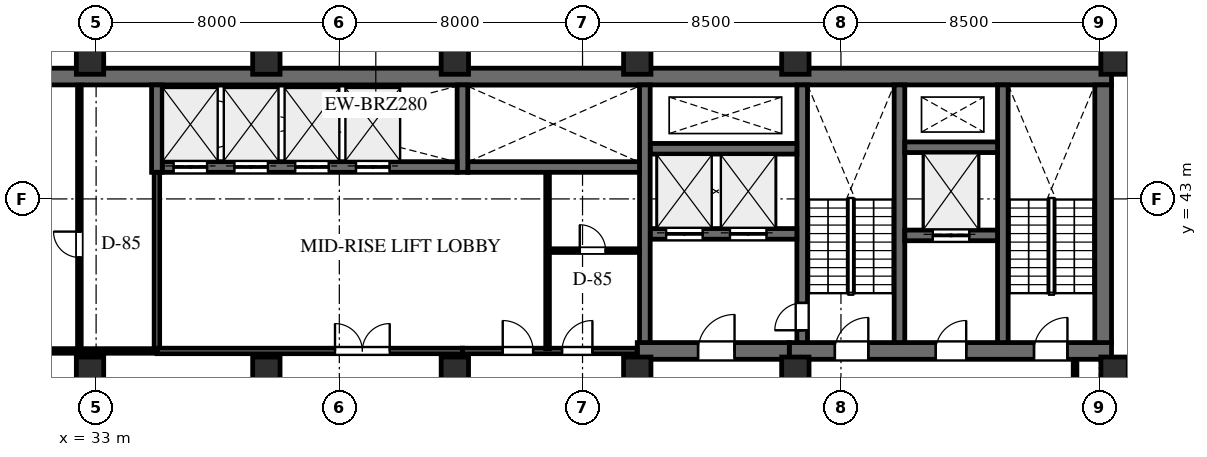
"""IFC4 building model, lengths in metres.
Left out: names, types, materials, properties, quantities, classifications, styles, units other than length and angle.
Written with IfcOpenShell. Run it as: python <this file> out.ifc"""

import sys

from ifc_helpers import new_model, si_unit, direction, frame, frame_2d, origin, origin_2d, place, context, subcontext, project, spatial, rectangle, extrude, element, fill, save


model = new_model("IFC4")
c1 = context("Model", 3, precision=1e-05, world=origin(), true_north=direction((0.0, 1.0)))
c2 = subcontext(c1, "Body", "Model", "MODEL_VIEW")
j1 = project(units=[si_unit("LENGTHUNIT", "METRE"), si_unit("PLANEANGLEUNIT", "RADIAN")], contexts=[c1])
p1 = place(None, origin())
s1 = spatial("IfcSite", under=j1, at=p1, CompositionType="ELEMENT")
p2 = place(p1, origin())
s2 = spatial("IfcBuilding", under=s1, at=p2, CompositionType="ELEMENT")
p3 = place(p2, frame((0.0, 0.0, 160.5)))
s3 = spatial("IfcBuildingStorey", under=s2, at=p3, CompositionType="ELEMENT", Elevation=160.5)
p4 = place(p3, frame((22.9, 47.025, 0.0), z_axis=(0.0, 0.0, 1.0), x_axis=(1.0, 0.0, 0.0)))
e1 = element("IfcWall", 1, at=p4, inside=s3, PredefinedType="SHEAR", context=c2, shape_type="SweptSolid", body=[
    extrude(rectangle(XDim=43.5, YDim=0.55, at=frame_2d((21.75, 0.0))), origin(), (0.0, 0.0, 1.0), 4.0),
])
p5 = place(p3, frame((55.8, 38.0, 0.0), z_axis=(0.0, 0.0, 1.0), x_axis=(1.0, 0.0, 0.0)))
e2 = element("IfcWall", 2, at=p5, inside=s3, PredefinedType="SHEAR", context=c2, shape_type="SweptSolid", body=[
    extrude(rectangle(XDim=10.6, YDim=0.55, at=frame_2d((5.3, 0.0))), origin(), (0.0, 0.0, 1.0), 4.0),
])
p6 = place(p5, frame((1.5, 0.0, 0.0)))
e3 = element("IfcOpeningElement", 3, at=p6, cuts=e2, PredefinedType="OPENING", context=c2, shape_type="SweptSolid", body=[
    extrude(rectangle(XDim=1.1, YDim=2.2, at=frame_2d((0.55, 1.1))), frame((0.0, 0.285, 0.0), z_axis=(0.0, -1.0, 0.0), x_axis=(1.0, 0.0, 0.0)), (0.0, 0.0, 1.0), 0.57),
])
p7 = place(p5, frame((4.82, 0.0, 0.0)))
e4 = element("IfcOpeningElement", 4, at=p7, cuts=e2, PredefinedType="OPENING", context=c2, shape_type="SweptSolid", body=[
    extrude(rectangle(XDim=1.0, YDim=2.15, at=frame_2d((0.5, 1.075))), frame((0.0, 0.285, 0.0), z_axis=(0.0, -1.0, 0.0), x_axis=(1.0, 0.0, 0.0)), (0.0, 0.0, 1.0), 0.57),
])
p8 = place(p5, frame((8.05, 0.0, 0.0)))
e5 = element("IfcOpeningElement", 5, at=p8, cuts=e2, PredefinedType="OPENING", context=c2, shape_type="SweptSolid", body=[
    extrude(rectangle(XDim=1.1, YDim=2.2, at=frame_2d((0.55, 1.1))), frame((0.0, 0.285, 0.0), z_axis=(0.0, -1.0, 0.0), x_axis=(1.0, 0.0, 0.0)), (0.0, 0.0, 1.0), 0.57),
])
p9 = place(p3, frame((66.125, 38.275, 0.0), z_axis=(0.0, 0.0, 1.0), x_axis=(0.0, 1.0, 0.0)))
e6 = element("IfcWall", 6, at=p9, inside=s3, PredefinedType="SHEAR", context=c2, shape_type="SweptSolid", body=[
    extrude(rectangle(XDim=8.475, YDim=0.55, at=frame_2d((4.238, 0.0))), origin(), (0.0, 0.0, 1.0), 4.0),
])
for number, where, z_axis, x_axis in (
    (7, (62.825, 38.275, 0.0), (0.0, 0.0, 1.0), (0.0, 1.0, 0.0)),
    (8, (59.425, 38.275, 0.0), (0.0, 0.0, 1.0), (0.0, 1.0, 0.0)),
):
    element("IfcWall", number, at=place(p3, frame(where, z_axis=z_axis, x_axis=x_axis)), inside=s3, PredefinedType="SHEAR", context=c2, shape_type="SweptSolid", body=[
        extrude(rectangle(XDim=8.475, YDim=0.35, at=frame_2d((4.238, 0.0))), origin(), (0.0, 0.0, 1.0), 4.0),
    ])
p10 = place(p3, frame((56.225, 38.275, 0.0), z_axis=(0.0, 0.0, 1.0), x_axis=(0.0, 1.0, 0.0)))
e9 = element("IfcWall", 9, at=p10, inside=s3, PredefinedType="SHEAR", context=c2, shape_type="SweptSolid", body=[
    extrude(rectangle(XDim=8.475, YDim=0.35, at=frame_2d((4.238, 0.0))), origin(), (0.0, 0.0, 1.0), 4.0),
])
p11 = place(p10, frame((0.405, 0.0, 0.0)))
e10 = element("IfcOpeningElement", 10, at=p11, cuts=e9, PredefinedType="OPENING", context=c2, shape_type="SweptSolid", body=[
    extrude(rectangle(XDim=0.9, YDim=2.15, at=frame_2d((0.45, 1.075))), frame((0.0, 0.185, 0.0), z_axis=(0.0, -1.0, 0.0), x_axis=(1.0, 0.0, 0.0)), (0.0, 0.0, 1.0), 0.37),
])
p12 = place(p3, frame((59.6, 41.8, 0.0), z_axis=(0.0, 0.0, 1.0), x_axis=(1.0, 0.0, 0.0)))
e11 = element("IfcWall", 11, at=p12, inside=s3, PredefinedType="SHEAR", context=c2, shape_type="SweptSolid", body=[
    extrude(rectangle(XDim=3.05, YDim=0.35, at=frame_2d((1.525, 0.0))), origin(), (0.0, 0.0, 1.0), 4.0),
])
p13 = place(p12, frame((0.92, 0.0, 0.0)))
e12 = element("IfcOpeningElement", 12, at=p13, cuts=e11, PredefinedType="OPENING", context=c2, shape_type="SweptSolid", body=[
    extrude(rectangle(XDim=1.2, YDim=2.2, at=frame_2d((0.6, 1.1))), frame((0.0, 0.185, 0.0), z_axis=(0.0, -1.0, 0.0), x_axis=(1.0, 0.0, 0.0)), (0.0, 0.0, 1.0), 0.37),
])
p14 = place(p3, frame((59.6, 44.7, 0.0), z_axis=(0.0, 0.0, 1.0), x_axis=(1.0, 0.0, 0.0)))
e13 = element("IfcWall", 13, at=p14, inside=s3, PredefinedType="SHEAR", context=c2, shape_type="SweptSolid", body=[
    extrude(rectangle(XDim=3.05, YDim=0.35, at=frame_2d((1.525, 0.0))), origin(), (0.0, 0.0, 1.0), 4.0),
])
p15 = place(p3, frame((50.8, 38.0, 0.0), z_axis=(0.0, 0.0, 1.0), x_axis=(1.0, 0.0, 0.0)))
e14 = element("IfcWall", 14, at=p15, inside=s3, PredefinedType="SHEAR", context=c2, shape_type="SweptSolid", body=[
    extrude(rectangle(XDim=5.0, YDim=0.55, at=frame_2d((2.5, 0.0))), origin(), (0.0, 0.0, 1.0), 4.0),
])
p16 = place(p15, frame((2.0, 0.0, 0.0)))
e15 = element("IfcOpeningElement", 15, at=p16, cuts=e14, PredefinedType="OPENING", context=c2, shape_type="SweptSolid", body=[
    extrude(rectangle(XDim=1.2, YDim=2.2, at=frame_2d((0.6, 1.1))), frame((0.0, 0.285, 0.0), z_axis=(0.0, -1.0, 0.0), x_axis=(1.0, 0.0, 0.0)), (0.0, 0.0, 1.0), 0.57),
])
p17 = place(p3, frame((51.225, 41.85, 0.0), z_axis=(0.0, 0.0, 1.0), x_axis=(1.0, 0.0, 0.0)))
e16 = element("IfcWall", 16, at=p17, inside=s3, PredefinedType="SHEAR", context=c2, shape_type="SweptSolid", body=[
    extrude(rectangle(XDim=4.825, YDim=0.35, at=frame_2d((2.413, 0.0))), origin(), (0.0, 0.0, 1.0), 4.0),
])
p18 = place(p17, frame((0.525, 0.0, 0.0)))
e17 = element("IfcOpeningElement", 17, at=p18, cuts=e16, PredefinedType="OPENING", context=c2, shape_type="SweptSolid", body=[
    extrude(rectangle(XDim=1.2, YDim=2.2, at=frame_2d((0.6, 1.1))), frame((0.0, 0.185, 0.0), z_axis=(0.0, -1.0, 0.0), x_axis=(1.0, 0.0, 0.0)), (0.0, 0.0, 1.0), 0.37),
])
p19 = place(p17, frame((2.625, 0.0, 0.0)))
e18 = element("IfcOpeningElement", 18, at=p19, cuts=e16, PredefinedType="OPENING", context=c2, shape_type="SweptSolid", body=[
    extrude(rectangle(XDim=1.2, YDim=2.2, at=frame_2d((0.6, 1.1))), frame((0.0, 0.185, 0.0), z_axis=(0.0, -1.0, 0.0), x_axis=(1.0, 0.0, 0.0)), (0.0, 0.0, 1.0), 0.37),
])
p20 = place(p3, frame((51.225, 44.65, 0.0), z_axis=(0.0, 0.0, 1.0), x_axis=(1.0, 0.0, 0.0)))
e19 = element("IfcWall", 19, at=p20, inside=s3, PredefinedType="SHEAR", context=c2, shape_type="SweptSolid", body=[
    extrude(rectangle(XDim=4.825, YDim=0.35, at=frame_2d((2.413, 0.0))), origin(), (0.0, 0.0, 1.0), 4.0),
])
p21 = place(p3, frame((51.05, 38.275, 0.0), z_axis=(0.0, 0.0, 1.0), x_axis=(0.0, 1.0, 0.0)))
e20 = element("IfcWall", 20, at=p21, inside=s3, PredefinedType="SHEAR", context=c2, shape_type="SweptSolid", body=[
    extrude(rectangle(XDim=8.475, YDim=0.35, at=frame_2d((4.238, 0.0))), origin(), (0.0, 0.0, 1.0), 4.0),
])
p22 = place(p3, frame((45.225, 44.05, 0.0), z_axis=(0.0, 0.0, 1.0), x_axis=(1.0, 0.0, 0.0)))
e21 = element("IfcWall", 21, at=p22, inside=s3, PredefinedType="SHEAR", context=c2, shape_type="SweptSolid", body=[
    extrude(rectangle(XDim=5.65, YDim=0.35, at=frame_2d((2.825, 0.0))), origin(), (0.0, 0.0, 1.0), 4.0),
])
p23 = place(p3, frame((45.05, 43.875, 0.0), z_axis=(0.0, 0.0, 1.0), x_axis=(0.0, 1.0, 0.0)))
e22 = element("IfcWall", 22, at=p23, inside=s3, PredefinedType="SHEAR", context=c2, shape_type="SweptSolid", body=[
    extrude(rectangle(XDim=2.875, YDim=0.35, at=frame_2d((1.438, 0.0))), origin(), (0.0, 0.0, 1.0), 4.0),
])
p24 = place(p3, frame((35.175, 44.05, 0.0), z_axis=(0.0, 0.0, 1.0), x_axis=(1.0, 0.0, 0.0)))
e23 = element("IfcWall", 23, at=p24, inside=s3, PredefinedType="SHEAR", context=c2, shape_type="SweptSolid", body=[
    extrude(rectangle(XDim=9.7, YDim=0.35, at=frame_2d((4.85, 0.0))), origin(), (0.0, 0.0, 1.0), 4.0),
])
p25 = place(p24, frame((0.375, 0.0, 0.0)))
e24 = element("IfcOpeningElement", 24, at=p25, cuts=e23, PredefinedType="OPENING", context=c2, shape_type="SweptSolid", body=[
    extrude(rectangle(XDim=1.1, YDim=2.2, at=frame_2d((0.55, 1.1))), frame((0.0, 0.185, 0.0), z_axis=(0.0, -1.0, 0.0), x_axis=(1.0, 0.0, 0.0)), (0.0, 0.0, 1.0), 0.37),
])
p26 = place(p24, frame((2.375, 0.0, 0.0)))
e25 = element("IfcOpeningElement", 25, at=p26, cuts=e23, PredefinedType="OPENING", context=c2, shape_type="SweptSolid", body=[
    extrude(rectangle(XDim=1.1, YDim=2.2, at=frame_2d((0.55, 1.1))), frame((0.0, 0.185, 0.0), z_axis=(0.0, -1.0, 0.0), x_axis=(1.0, 0.0, 0.0)), (0.0, 0.0, 1.0), 0.37),
])
p27 = place(p24, frame((4.375, 0.0, 0.0)))
e26 = element("IfcOpeningElement", 26, at=p27, cuts=e23, PredefinedType="OPENING", context=c2, shape_type="SweptSolid", body=[
    extrude(rectangle(XDim=1.1, YDim=2.2, at=frame_2d((0.55, 1.1))), frame((0.0, 0.185, 0.0), z_axis=(0.0, -1.0, 0.0), x_axis=(1.0, 0.0, 0.0)), (0.0, 0.0, 1.0), 0.37),
])
p28 = place(p24, frame((6.375, 0.0, 0.0)))
e27 = element("IfcOpeningElement", 27, at=p28, cuts=e23, PredefinedType="OPENING", context=c2, shape_type="SweptSolid", body=[
    extrude(rectangle(XDim=1.1, YDim=2.2, at=frame_2d((0.55, 1.1))), frame((0.0, 0.185, 0.0), z_axis=(0.0, -1.0, 0.0), x_axis=(1.0, 0.0, 0.0)), (0.0, 0.0, 1.0), 0.37),
])
p29 = place(p3, frame((35.0, 43.875, 0.0), z_axis=(0.0, 0.0, 1.0), x_axis=(0.0, 1.0, 0.0)))
e28 = element("IfcWall", 28, at=p29, inside=s3, PredefinedType="SHEAR", context=c2, shape_type="SweptSolid", body=[
    extrude(rectangle(XDim=2.875, YDim=0.35, at=frame_2d((1.438, 0.0))), origin(), (0.0, 0.0, 1.0), 4.0),
])
for number, where, z_axis, x_axis in (
    (29, (66.5, 47.55, 0.0), (0.0, 0.0, 1.0), (1.0, 0.0, 0.0)),
    (30, (56.0, 47.55, 0.0), (0.0, 0.0, 1.0), (1.0, 0.0, 0.0)),
    (31, (66.5, 37.35, 0.0), (0.0, 0.0, 1.0), (1.0, 0.0, 0.0)),
    (32, (56.0, 37.35, 0.0), (0.0, 0.0, 1.0), (1.0, 0.0, 0.0)),
    (33, (50.8, 47.55, 0.0), (0.0, 0.0, 1.0), (1.0, 0.0, 0.0)),
    (34, (50.8, 37.35, 0.0), (0.0, 0.0, 1.0), (1.0, 0.0, 0.0)),
    (35, (44.8, 37.35, 0.0), (0.0, 0.0, 1.0), (1.0, 0.0, 0.0)),
    (36, (44.8, 47.55, 0.0), (0.0, 0.0, 1.0), (1.0, 0.0, 0.0)),
    (37, (38.6, 37.35, 0.0), (0.0, 0.0, 1.0), (1.0, 0.0, 0.0)),
    (38, (38.6, 47.55, 0.0), (0.0, 0.0, 1.0), (1.0, 0.0, 0.0)),
    (39, (32.8, 37.35, 0.0), (0.0, 0.0, 1.0), (1.0, 0.0, 0.0)),
    (40, (32.8, 47.55, 0.0), (0.0, 0.0, 1.0), (1.0, 0.0, 0.0)),
):
    element("IfcColumn", number, at=place(p3, frame(where, z_axis=z_axis, x_axis=x_axis)), inside=s3, PredefinedType="COLUMN", context=c2, shape_type="SweptSolid", body=[
        extrude(rectangle(XDim=0.9, YDim=0.9, at=origin_2d()), origin(), (0.0, 0.0, 1.0), 4.0),
    ])
p30 = place(p3, frame((45.05, 38.0, 0.0), z_axis=(0.0, 0.0, 1.0), x_axis=(1.0, 0.0, 0.0)))
e41 = element("IfcWall", 41, at=p30, inside=s3, PredefinedType="STANDARD", context=c2, shape_type="SweptSolid", body=[
    extrude(rectangle(XDim=5.75, YDim=0.18, at=frame_2d((2.875, 0.0))), origin(), (0.0, 0.0, 1.0), 2.982),
])
p31 = place(p30, frame((1.325, 0.0, 0.0)))
e42 = element("IfcOpeningElement", 42, at=p31, cuts=e41, PredefinedType="OPENING", context=c2, shape_type="SweptSolid", body=[
    extrude(rectangle(XDim=1.0, YDim=2.15, at=frame_2d((0.5, 1.075))), frame((0.0, 0.1, 0.0), z_axis=(0.0, -1.0, 0.0), x_axis=(1.0, 0.0, 0.0)), (0.0, 0.0, 1.0), 0.2),
])
p32 = place(p30, frame((3.275, 0.0, 0.0)))
e43 = element("IfcOpeningElement", 43, at=p32, cuts=e41, PredefinedType="OPENING", context=c2, shape_type="SweptSolid", body=[
    extrude(rectangle(XDim=1.0, YDim=2.15, at=frame_2d((0.5, 1.075))), frame((0.0, 0.1, 0.0), z_axis=(0.0, -1.0, 0.0), x_axis=(1.0, 0.0, 0.0)), (0.0, 0.0, 1.0), 0.2),
])
p33 = place(p3, frame((47.85, 38.068, 0.0), z_axis=(0.0, 0.0, 1.0), x_axis=(0.0, 1.0, 0.0)))
e44 = element("IfcWall", 44, at=p33, inside=s3, PredefinedType="PARTITIONING", context=c2, shape_type="SweptSolid", body=[
    extrude(rectangle(XDim=5.799, YDim=0.12, at=frame_2d((2.899, 0.0))), origin(), (0.0, 0.0, 1.0), 3.755),
])
p34 = place(p3, frame((47.918, 41.3, 0.0), z_axis=(0.0, 0.0, 1.0), x_axis=(1.0, 0.0, 0.0)))
e45 = element("IfcWall", 45, at=p34, inside=s3, PredefinedType="PARTITIONING", context=c2, shape_type="SweptSolid", body=[
    extrude(rectangle(XDim=2.949, YDim=0.12, at=frame_2d((1.475, 0.0))), origin(), (0.0, 0.0, 1.0), 2.982),
])
p35 = place(p34, frame((0.991, 0.0, 0.0)))
e46 = element("IfcOpeningElement", 46, at=p35, cuts=e45, PredefinedType="OPENING", context=c2, shape_type="SweptSolid", body=[
    extrude(rectangle(XDim=0.85, YDim=2.1, at=frame_2d((0.425, 1.05))), frame((0.0, 0.07, 0.0), z_axis=(0.0, -1.0, 0.0), x_axis=(1.0, 0.0, 0.0)), (0.0, 0.0, 1.0), 0.14),
])
p36 = place(p3, frame((27.05, 38.0, 0.0), z_axis=(0.0, 0.0, 1.0), x_axis=(1.0, 0.0, 0.0)))
e47 = element("IfcWall", 47, at=p36, inside=s3, PredefinedType="PARTITIONING", context=c2, shape_type="SweptSolid", body=[
    extrude(rectangle(XDim=7.95, YDim=0.15, at=frame_2d((3.975, 0.0))), origin(), (0.0, 0.0, 1.0), 2.982),
])
p37 = place(p36, frame((1.7, 0.0, 0.0)))
e48 = element("IfcOpeningElement", 48, at=p37, cuts=e47, PredefinedType="OPENING", context=c2, shape_type="SweptSolid", body=[
    extrude(rectangle(XDim=0.9, YDim=2.1, at=frame_2d((0.45, 1.05))), frame((0.0, 0.085, 0.0), z_axis=(0.0, -1.0, 0.0), x_axis=(1.0, 0.0, 0.0)), (0.0, 0.0, 1.0), 0.17),
])
p38 = place(p36, frame((3.3, 0.0, 0.0)))
e49 = element("IfcOpeningElement", 49, at=p38, cuts=e47, PredefinedType="OPENING", context=c2, shape_type="SweptSolid", body=[
    extrude(rectangle(XDim=0.9, YDim=2.1, at=frame_2d((0.45, 1.05))), frame((0.0, 0.085, 0.0), z_axis=(0.0, -1.0, 0.0), x_axis=(1.0, 0.0, 0.0)), (0.0, 0.0, 1.0), 0.17),
])
p39 = place(p3, frame((35.0, 38.0, 0.0), z_axis=(0.0, 0.0, 1.0), x_axis=(0.0, 1.0, 0.0)))
e50 = element("IfcWall", 50, at=p39, inside=s3, PredefinedType="STANDARD", context=c2, shape_type="SweptSolid", body=[
    extrude(rectangle(XDim=5.875, YDim=0.18, at=frame_2d((2.938, 0.0))), origin(), (0.0, 0.0, 1.0), 3.755),
])
p40 = place(p3, frame((32.45, 38.068, 0.0), z_axis=(0.0, 0.0, 1.0), x_axis=(0.0, 1.0, 0.0)))
e51 = element("IfcWall", 51, at=p40, inside=s3, PredefinedType="PARTITIONING", context=c2, shape_type="SweptSolid", body=[
    extrude(rectangle(XDim=8.674, YDim=0.12, at=frame_2d((4.337, 0.0))), origin(), (0.0, 0.0, 1.0), 3.755),
])
p41 = place(p40, frame((3.007, 0.0, 0.0)))
e52 = element("IfcOpeningElement", 52, at=p41, cuts=e51, PredefinedType="OPENING", context=c2, shape_type="SweptSolid", body=[
    extrude(rectangle(XDim=0.85, YDim=2.1, at=frame_2d((0.425, 1.05))), frame((0.0, 0.07, 0.0), z_axis=(0.0, -1.0, 0.0), x_axis=(1.0, 0.0, 0.0)), (0.0, 0.0, 1.0), 0.14),
])
p42 = place(p3, frame((35.0, 38.0, 0.0), z_axis=(0.0, 0.0, 1.0), x_axis=(1.0, 0.0, 0.0)))
e53 = element("IfcWall", 53, at=p42, inside=s3, PredefinedType="STANDARD", context=c2, shape_type="SweptSolid", body=[
    extrude(rectangle(XDim=10.05, YDim=0.18, at=frame_2d((5.025, 0.0))), origin(), (0.0, 0.0, 1.0), 2.982),
])
p43 = place(p42, frame((5.858, 0.0, 0.0)))
e54 = element("IfcOpeningElement", 54, at=p43, cuts=e53, PredefinedType="OPENING", context=c2, shape_type="SweptSolid", body=[
    extrude(rectangle(XDim=1.8, YDim=2.2, at=frame_2d((0.9, 1.1))), frame((0.0, 0.1, 0.0), z_axis=(0.0, -1.0, 0.0), x_axis=(1.0, 0.0, 0.0)), (0.0, 0.0, 1.0), 0.2),
])
p44 = place(p3, frame((65.2, 34.4, 0.0), z_axis=(0.0, 0.0, 1.0), x_axis=(0.0, 1.0, 0.0)))
e55 = element("IfcWall", 55, at=p44, inside=s3, PredefinedType="PARTITIONING", context=c2, shape_type="SweptSolid", body=[
    extrude(rectangle(XDim=3.317, YDim=0.12, at=frame_2d((1.659, 0.0))), origin(), (0.0, 0.0, 1.0), 2.982),
])
p45 = place(p6, origin())
e56 = element("IfcDoor", 56, at=p45, inside=s3, OperationType="SINGLE_SWING_RIGHT", PredefinedType="DOOR", context=c2, shape_type="SweptSolid", body=[
    extrude(rectangle(XDim=1.1, YDim=2.2, at=frame_2d((0.55, 1.1))), frame((0.0, 0.025, 0.0), z_axis=(0.0, -1.0, 0.0), x_axis=(1.0, 0.0, 0.0)), (0.0, 0.0, 1.0), 0.05),
])
fill(e3, e56)
p46 = place(p7, origin())
e57 = element("IfcDoor", 57, at=p46, inside=s3, OperationType="SINGLE_SWING_RIGHT", PredefinedType="DOOR", context=c2, shape_type="SweptSolid", body=[
    extrude(rectangle(XDim=1.0, YDim=2.15, at=frame_2d((0.5, 1.075))), frame((0.0, 0.025, 0.0), z_axis=(0.0, -1.0, 0.0), x_axis=(1.0, 0.0, 0.0)), (0.0, 0.0, 1.0), 0.05),
])
fill(e4, e57)
p47 = place(p8, origin())
e58 = element("IfcDoor", 58, at=p47, inside=s3, OperationType="SINGLE_SWING_RIGHT", PredefinedType="DOOR", context=c2, shape_type="SweptSolid", body=[
    extrude(rectangle(XDim=1.1, YDim=2.2, at=frame_2d((0.55, 1.1))), frame((0.0, 0.025, 0.0), z_axis=(0.0, -1.0, 0.0), x_axis=(1.0, 0.0, 0.0)), (0.0, 0.0, 1.0), 0.05),
])
fill(e5, e58)
p48 = place(p16, origin())
e59 = element("IfcDoor", 59, at=p48, inside=s3, OperationType="SINGLE_SWING_RIGHT", PredefinedType="DOOR", context=c2, shape_type="SweptSolid", body=[
    extrude(rectangle(XDim=1.2, YDim=2.2, at=frame_2d((0.6, 1.1))), frame((0.0, 0.025, 0.0), z_axis=(0.0, -1.0, 0.0), x_axis=(1.0, 0.0, 0.0)), (0.0, 0.0, 1.0), 0.05),
])
fill(e15, e59)
p49 = place(p11, origin())
e60 = element("IfcDoor", 60, at=p49, inside=s3, OperationType="SINGLE_SWING_LEFT", PredefinedType="DOOR", context=c2, shape_type="SweptSolid", body=[
    extrude(rectangle(XDim=0.9, YDim=2.15, at=frame_2d((0.45, 1.075))), frame((0.0, 0.025, 0.0), z_axis=(0.0, -1.0, 0.0), x_axis=(1.0, 0.0, 0.0)), (0.0, 0.0, 1.0), 0.05),
])
fill(e10, e60)
p50 = place(p25, origin())
e61 = element("IfcDoor", 61, at=p50, inside=s3, OperationType="DOUBLE_DOOR_SLIDING", PredefinedType="DOOR", context=c2, shape_type="SweptSolid", body=[
    extrude(rectangle(XDim=1.1, YDim=2.2, at=frame_2d((0.55, 1.1))), frame((0.0, 0.025, 0.0), z_axis=(0.0, -1.0, 0.0), x_axis=(1.0, 0.0, 0.0)), (0.0, 0.0, 1.0), 0.05),
])
fill(e24, e61)
p51 = place(p26, origin())
e62 = element("IfcDoor", 62, at=p51, inside=s3, OperationType="DOUBLE_DOOR_SLIDING", PredefinedType="DOOR", context=c2, shape_type="SweptSolid", body=[
    extrude(rectangle(XDim=1.1, YDim=2.2, at=frame_2d((0.55, 1.1))), frame((0.0, 0.025, 0.0), z_axis=(0.0, -1.0, 0.0), x_axis=(1.0, 0.0, 0.0)), (0.0, 0.0, 1.0), 0.05),
])
fill(e25, e62)
p52 = place(p27, origin())
e63 = element("IfcDoor", 63, at=p52, inside=s3, OperationType="DOUBLE_DOOR_SLIDING", PredefinedType="DOOR", context=c2, shape_type="SweptSolid", body=[
    extrude(rectangle(XDim=1.1, YDim=2.2, at=frame_2d((0.55, 1.1))), frame((0.0, 0.025, 0.0), z_axis=(0.0, -1.0, 0.0), x_axis=(1.0, 0.0, 0.0)), (0.0, 0.0, 1.0), 0.05),
])
fill(e26, e63)
p53 = place(p28, origin())
e64 = element("IfcDoor", 64, at=p53, inside=s3, OperationType="DOUBLE_DOOR_SLIDING", PredefinedType="DOOR", context=c2, shape_type="SweptSolid", body=[
    extrude(rectangle(XDim=1.1, YDim=2.2, at=frame_2d((0.55, 1.1))), frame((0.0, 0.025, 0.0), z_axis=(0.0, -1.0, 0.0), x_axis=(1.0, 0.0, 0.0)), (0.0, 0.0, 1.0), 0.05),
])
fill(e27, e64)
p54 = place(p18, origin())
e65 = element("IfcDoor", 65, at=p54, inside=s3, OperationType="DOUBLE_DOOR_SLIDING", PredefinedType="DOOR", context=c2, shape_type="SweptSolid", body=[
    extrude(rectangle(XDim=1.2, YDim=2.2, at=frame_2d((0.6, 1.1))), frame((0.0, 0.025, 0.0), z_axis=(0.0, -1.0, 0.0), x_axis=(1.0, 0.0, 0.0)), (0.0, 0.0, 1.0), 0.05),
])
fill(e17, e65)
p55 = place(p19, origin())
e66 = element("IfcDoor", 66, at=p55, inside=s3, OperationType="DOUBLE_DOOR_SLIDING", PredefinedType="DOOR", context=c2, shape_type="SweptSolid", body=[
    extrude(rectangle(XDim=1.2, YDim=2.2, at=frame_2d((0.6, 1.1))), frame((0.0, 0.025, 0.0), z_axis=(0.0, -1.0, 0.0), x_axis=(1.0, 0.0, 0.0)), (0.0, 0.0, 1.0), 0.05),
])
fill(e18, e66)
p56 = place(p13, origin())
e67 = element("IfcDoor", 67, at=p56, inside=s3, OperationType="DOUBLE_DOOR_SLIDING", PredefinedType="DOOR", context=c2, shape_type="SweptSolid", body=[
    extrude(rectangle(XDim=1.2, YDim=2.2, at=frame_2d((0.6, 1.1))), frame((0.0, 0.025, 0.0), z_axis=(0.0, -1.0, 0.0), x_axis=(1.0, 0.0, 0.0)), (0.0, 0.0, 1.0), 0.05),
])
fill(e12, e67)
p57 = place(p31, origin())
e68 = element("IfcDoor", 68, at=p57, inside=s3, OperationType="SINGLE_SWING_LEFT", PredefinedType="DOOR", context=c2, shape_type="SweptSolid", body=[
    extrude(rectangle(XDim=1.0, YDim=2.15, at=frame_2d((0.5, 1.075))), frame((0.0, 0.025, 0.0), z_axis=(0.0, -1.0, 0.0), x_axis=(1.0, 0.0, 0.0)), (0.0, 0.0, 1.0), 0.05),
])
fill(e42, e68)
p58 = place(p32, origin())
e69 = element("IfcDoor", 69, at=p58, inside=s3, OperationType="SINGLE_SWING_RIGHT", PredefinedType="DOOR", context=c2, shape_type="SweptSolid", body=[
    extrude(rectangle(XDim=1.0, YDim=2.15, at=frame_2d((0.5, 1.075))), frame((0.0, 0.025, 0.0), z_axis=(0.0, -1.0, 0.0), x_axis=(1.0, 0.0, 0.0)), (0.0, 0.0, 1.0), 0.05),
])
fill(e43, e69)
p59 = place(p35, origin())
e70 = element("IfcDoor", 70, at=p59, inside=s3, OperationType="SINGLE_SWING_LEFT", PredefinedType="DOOR", context=c2, shape_type="SweptSolid", body=[
    extrude(rectangle(XDim=0.85, YDim=2.1, at=frame_2d((0.425, 1.05))), frame((0.0, 0.025, 0.0), z_axis=(0.0, -1.0, 0.0), x_axis=(1.0, 0.0, 0.0)), (0.0, 0.0, 1.0), 0.05),
])
fill(e46, e70)
p60 = place(p41, origin())
e71 = element("IfcDoor", 71, at=p60, inside=s3, OperationType="SINGLE_SWING_RIGHT", PredefinedType="DOOR", context=c2, shape_type="SweptSolid", body=[
    extrude(rectangle(XDim=0.85, YDim=2.1, at=frame_2d((0.425, 1.05))), frame((0.0, 0.025, 0.0), z_axis=(0.0, -1.0, 0.0), x_axis=(1.0, 0.0, 0.0)), (0.0, 0.0, 1.0), 0.05),
])
fill(e52, e71)
p61 = place(p43, origin())
e72 = element("IfcDoor", 72, at=p61, inside=s3, OperationType="DOUBLE_DOOR_SINGLE_SWING", PredefinedType="DOOR", context=c2, shape_type="SweptSolid", body=[
    extrude(rectangle(XDim=1.8, YDim=2.2, at=frame_2d((0.9, 1.1))), frame((0.0, 0.025, 0.0), z_axis=(0.0, -1.0, 0.0), x_axis=(1.0, 0.0, 0.0)), (0.0, 0.0, 1.0), 0.05),
])
fill(e54, e72)
save(model, sys.argv[1])
